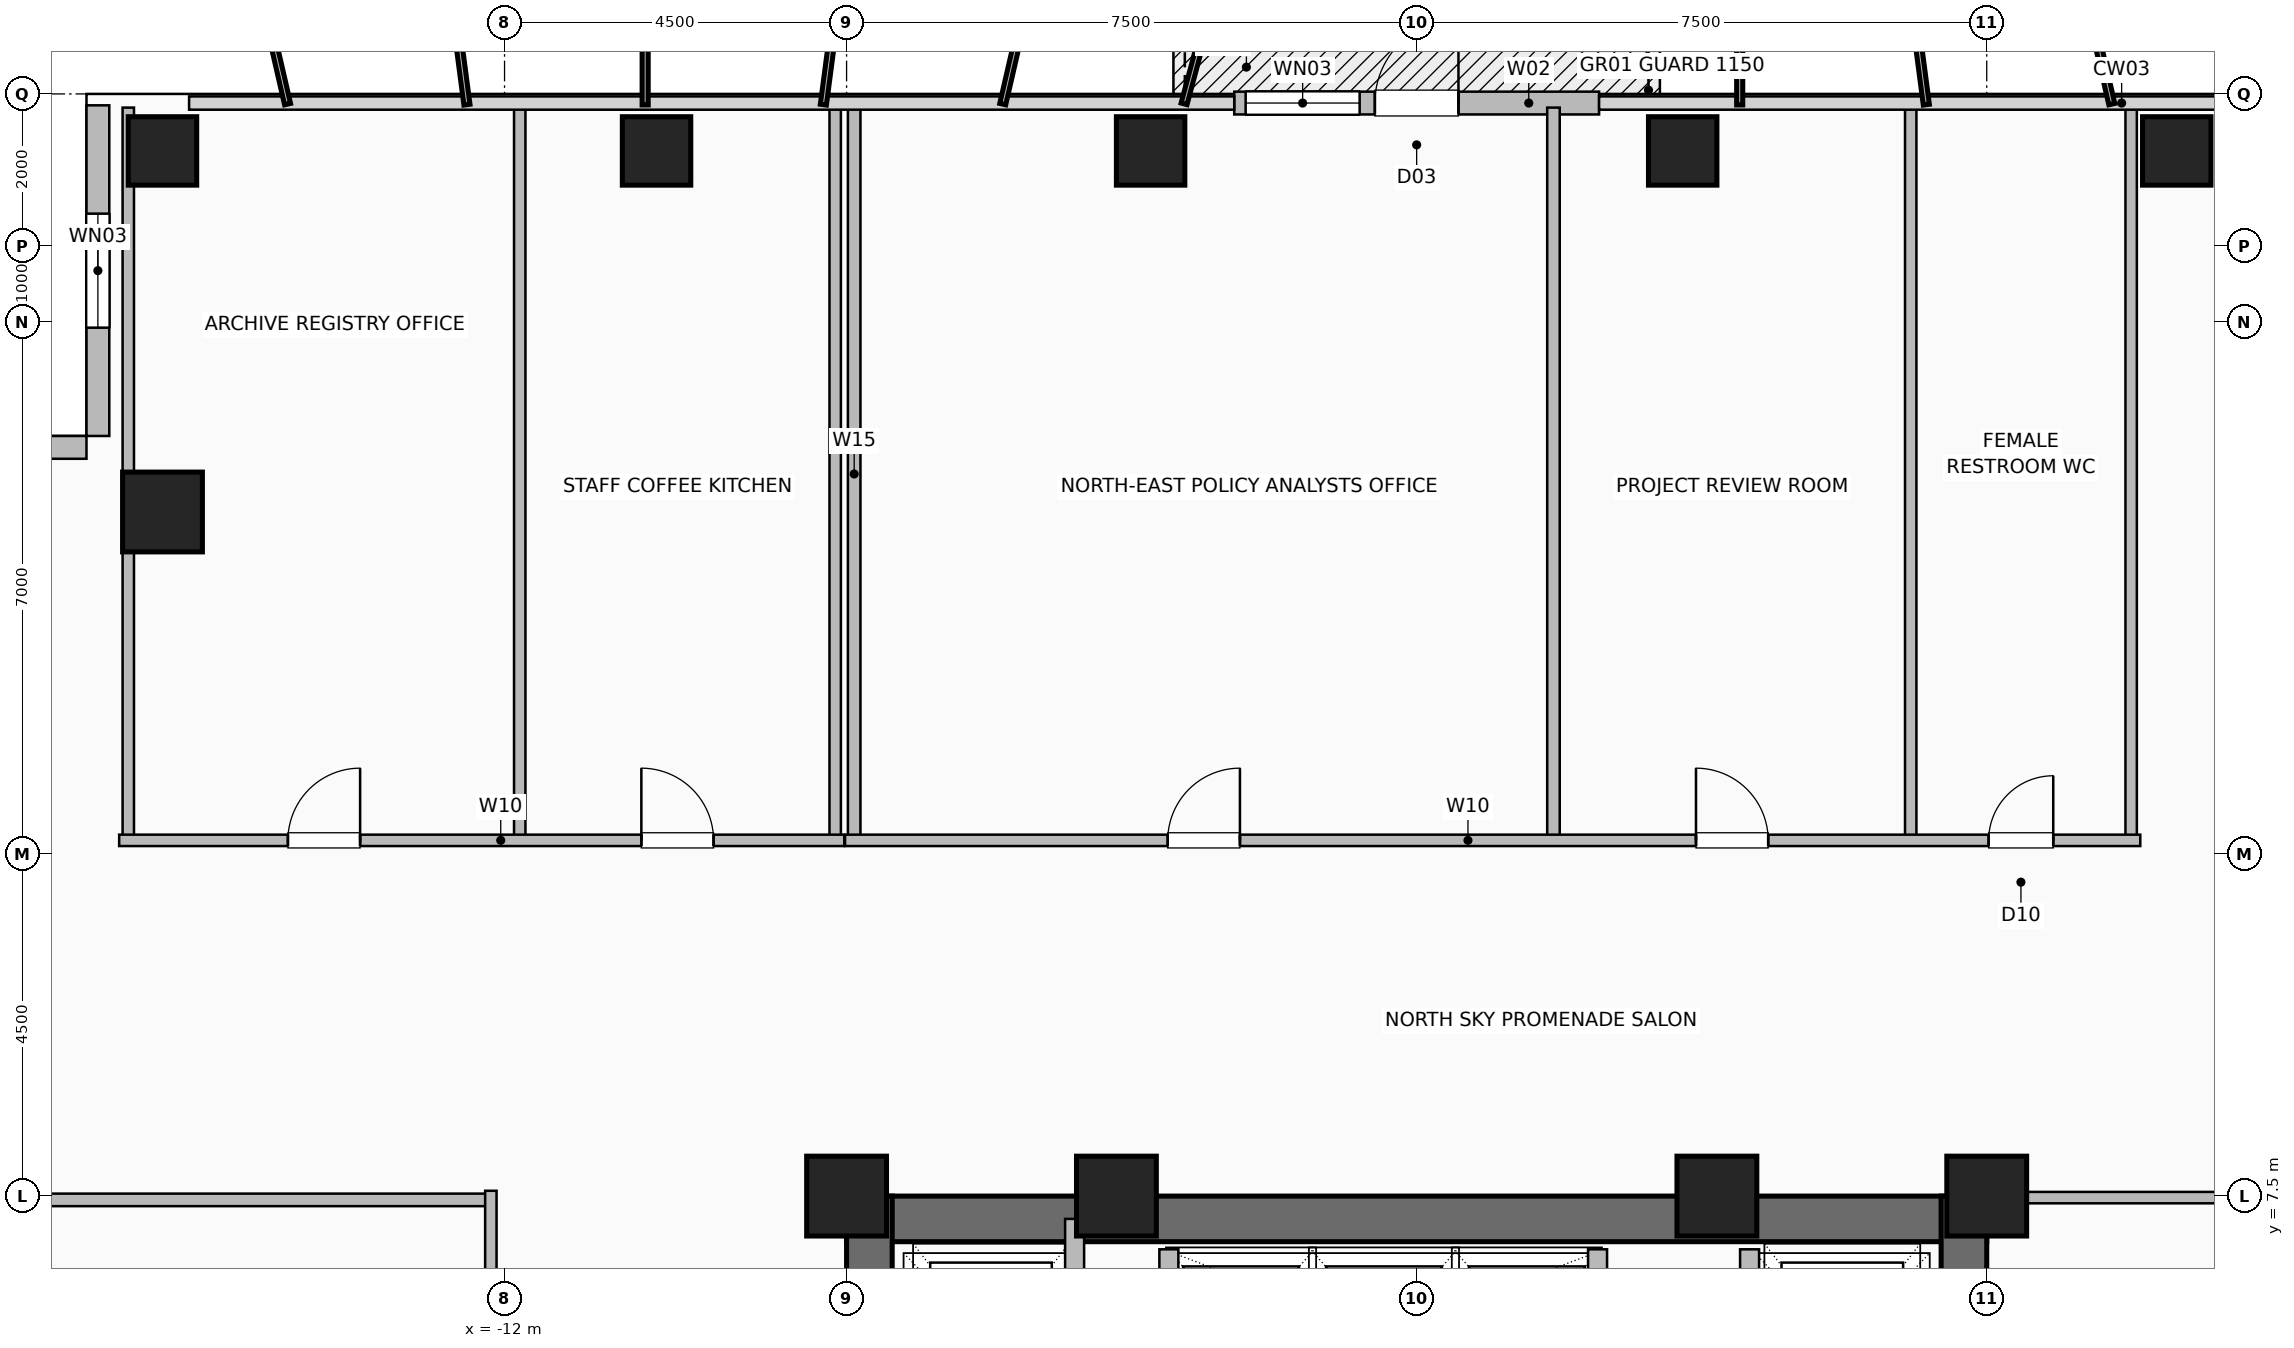
"""IFC4 building model, lengths in metres.
Left out: names, types, materials, properties, quantities, classifications, styles, units other than length and angle.
Written with IfcOpenShell. Run it as: python <this file> out.ifc"""

import sys

from ifc_helpers import new_model, si_unit, direction, frame, frame_2d, origin, origin_2d, place, context, subcontext, project, spatial, rectangle, hollow_rectangle, extrude, element, fill, save


model = new_model("IFC4")
c1 = context("Model", 3, precision=1e-05, world=origin(), true_north=direction((0.0, 1.0)))
c2 = subcontext(c1, "Body", "Model", "MODEL_VIEW")
j1 = project(units=[si_unit("LENGTHUNIT", "METRE"), si_unit("PLANEANGLEUNIT", "RADIAN")], contexts=[c1])
p1 = place(None, origin())
s1 = spatial("IfcSite", under=j1, at=p1, CompositionType="ELEMENT")
p2 = place(p1, origin())
s2 = spatial("IfcBuilding", under=s1, at=p2, CompositionType="ELEMENT")
p3 = place(p2, frame((0.0, 0.0, 115.6)))
s3 = spatial("IfcBuildingStorey", under=s2, at=p3, CompositionType="ELEMENT", Elevation=115.6)
for number, where, z_axis, x_axis in (
    (1, (7.5, 7.5, 0.0), (0.0, 0.0, 1.0), (1.0, 0.0, 0.0)),
    (2, (3.95, 7.5, 0.0), (0.0, 0.0, 1.0), (1.0, 0.0, 0.0)),
    (3, (-3.95, 7.5, 0.0), (0.0, 0.0, 1.0), (1.0, 0.0, 0.0)),
    (4, (-7.5, 7.5, 0.0), (0.0, 0.0, 1.0), (1.0, 0.0, 0.0)),
):
    element("IfcColumn", number, at=place(p3, frame(where, z_axis=z_axis, x_axis=x_axis)), inside=s3, PredefinedType="COLUMN", context=c2, shape_type="SweptSolid", body=[
        extrude(hollow_rectangle(XDim=1.05, YDim=1.05, WallThickness=0.05, at=origin_2d()), origin(), (0.0, 0.0, 1.0), 3.6),
    ])
for number, where, z_axis, x_axis in (
    (5, (-16.5, 21.25, 0.0), (0.0, 0.0, 1.0), (1.0, 0.0, 0.0)),
    (6, (-10.0, 21.25, 0.0), (0.0, 0.0, 1.0), (1.0, 0.0, 0.0)),
    (7, (-3.5, 21.25, 0.0), (0.0, 0.0, 1.0), (1.0, 0.0, 0.0)),
    (8, (3.5, 21.25, 0.0), (0.0, 0.0, 1.0), (1.0, 0.0, 0.0)),
    (9, (10.0, 21.25, 0.0), (0.0, 0.0, 1.0), (1.0, 0.0, 0.0)),
):
    element("IfcColumn", number, at=place(p3, frame(where, z_axis=z_axis, x_axis=x_axis)), inside=s3, PredefinedType="COLUMN", context=c2, shape_type="SweptSolid", body=[
        extrude(hollow_rectangle(XDim=0.9, YDim=0.9, WallThickness=0.045, at=origin_2d()), origin(), (0.0, 0.0, 1.0), 3.6),
    ])
p4 = place(p3, frame((-16.5, 16.5, 0.0), z_axis=(0.0, 0.0, 1.0), x_axis=(1.0, 0.0, 0.0)))
e10 = element("IfcColumn", 10, at=p4, inside=s3, PredefinedType="COLUMN", context=c2, shape_type="SweptSolid", body=[
    extrude(hollow_rectangle(XDim=1.05, YDim=1.05, WallThickness=0.05, at=origin_2d()), origin(), (0.0, 0.0, 1.0), 3.6),
])
p5 = place(p3, frame((-2.4, 21.88, 0.0), z_axis=(0.0, 0.0, 1.0), x_axis=(1.0, 0.0, 0.0)))
e11 = element("IfcWall", 11, at=p5, inside=s3, PredefinedType="SOLIDWALL", context=c2, shape_type="SweptSolid", body=[
    extrude(rectangle(XDim=4.8, YDim=0.3, at=frame_2d((2.4, 0.0))), origin(), (0.0, 0.0, 1.0), 3.36),
])
p6 = place(p5, frame((1.85, 0.0, 0.0)))
e12 = element("IfcOpeningElement", 12, at=p6, cuts=e11, PredefinedType="OPENING", context=c2, shape_type="SweptSolid", body=[
    extrude(rectangle(XDim=1.1, YDim=2.2, at=frame_2d((0.55, 1.1))), frame((0.0, 0.16, 0.0), z_axis=(0.0, -1.0, 0.0), x_axis=(1.0, 0.0, 0.0)), (0.0, 0.0, 1.0), 0.32),
])
p7 = place(p5, frame((0.15, 0.0, 0.85)))
e13 = element("IfcOpeningElement", 13, at=p7, cuts=e11, PredefinedType="OPENING", context=c2, shape_type="SweptSolid", body=[
    extrude(rectangle(XDim=1.5, YDim=1.8, at=frame_2d((0.75, 0.9))), frame((0.0, 0.16, 0.0), z_axis=(0.0, -1.0, 0.0), x_axis=(1.0, 0.0, 0.0)), (0.0, 0.0, 1.0), 0.32),
])
p8 = place(p3, frame((-17.35, 21.85, 0.0), z_axis=(0.0, 0.0, 1.0), x_axis=(0.0, -1.0, 0.0)))
e14 = element("IfcWall", 14, at=p8, inside=s3, PredefinedType="SOLIDWALL", context=c2, shape_type="SweptSolid", body=[
    extrude(rectangle(XDim=4.35, YDim=0.3, at=frame_2d((2.175, 0.0))), origin(), (0.0, 0.0, 1.0), 3.36),
])
p9 = place(p8, frame((1.425, 0.0, 0.9)))
e15 = element("IfcOpeningElement", 15, at=p9, cuts=e14, PredefinedType="OPENING", context=c2, shape_type="SweptSolid", body=[
    extrude(rectangle(XDim=1.5, YDim=1.8, at=frame_2d((0.75, 0.9))), frame((0.0, 0.16, 0.0), z_axis=(0.0, -1.0, 0.0), x_axis=(1.0, 0.0, 0.0)), (0.0, 0.0, 1.0), 0.32),
])
p10 = place(p3, frame((-21.85, 17.35, 0.0), z_axis=(0.0, 0.0, 1.0), x_axis=(1.0, 0.0, 0.0)))
e16 = element("IfcWall", 16, at=p10, inside=s3, PredefinedType="SOLIDWALL", context=c2, shape_type="SweptSolid", body=[
    extrude(rectangle(XDim=4.35, YDim=0.3, at=frame_2d((2.175, 0.0))), origin(), (0.0, 0.0, 1.0), 3.36),
])
p11 = place(p3, frame((-7.5, 7.2, 0.0), z_axis=(0.0, 0.0, 1.0), x_axis=(1.0, 0.0, 0.0)))
e17 = element("IfcWall", 17, at=p11, inside=s3, PredefinedType="SHEAR", context=c2, shape_type="SweptSolid", body=[
    extrude(rectangle(XDim=15.0, YDim=0.6, at=frame_2d((7.5, 0.0))), origin(), (0.0, 0.0, 1.0), 3.36),
])
p12 = place(p3, frame((-7.2, -7.5, 0.0), z_axis=(0.0, 0.0, 1.0), x_axis=(0.0, 1.0, 0.0)))
e18 = element("IfcWall", 18, at=p12, inside=s3, PredefinedType="SHEAR", context=c2, shape_type="SweptSolid", body=[
    extrude(rectangle(XDim=15.0, YDim=0.6, at=frame_2d((7.5, 0.0))), origin(), (0.0, 0.0, 1.0), 3.36),
])
p13 = place(p12, frame((9.5, 0.0, 0.0)))
e19 = element("IfcOpeningElement", 19, at=p13, cuts=e18, PredefinedType="OPENING", context=c2, shape_type="SweptSolid", body=[
    extrude(rectangle(XDim=1.0, YDim=2.08, at=frame_2d((0.5, 1.04))), frame((0.0, 0.31, 0.0), z_axis=(0.0, -1.0, 0.0), x_axis=(1.0, 0.0, 0.0)), (0.0, 0.0, 1.0), 0.62),
])
p14 = place(p3, frame((7.2, -7.5, 0.0), z_axis=(0.0, 0.0, 1.0), x_axis=(0.0, 1.0, 0.0)))
e20 = element("IfcWall", 20, at=p14, inside=s3, PredefinedType="SHEAR", context=c2, shape_type="SweptSolid", body=[
    extrude(rectangle(XDim=15.0, YDim=0.6, at=frame_2d((7.5, 0.0))), origin(), (0.0, 0.0, 1.0), 3.36),
])
for number, where, z_axis, x_axis in (
    (21, (-3.26, 4.58, 0.0), (0.0, 0.0, 1.0), (0.0, 1.0, 0.0)),
    (22, (2.38, 4.58, 0.0), (0.0, 0.0, 1.0), (0.0, 1.0, 0.0)),
):
    element("IfcWall", number, at=place(p3, frame(where, z_axis=z_axis, x_axis=x_axis)), inside=s3, PredefinedType="SHEAR", context=c2, shape_type="SweptSolid", body=[
        extrude(rectangle(XDim=2.22, YDim=0.25, at=frame_2d((1.11, 0.0))), origin(), (0.0, 0.0, 1.0), 3.36),
    ])
p15 = place(p3, frame((-4.5, 4.35, 0.0), z_axis=(0.0, 0.0, 1.0), x_axis=(0.0, 1.0, 0.0)))
e23 = element("IfcWall", 23, at=p15, inside=s3, PredefinedType="SHEAR", context=c2, shape_type="SweptSolid", body=[
    extrude(rectangle(XDim=2.85, YDim=0.25, at=frame_2d((1.425, 0.0))), origin(), (0.0, 0.0, 1.0), 3.36),
])
p16 = place(p3, frame((4.38, 4.3, 0.0), z_axis=(0.0, 0.0, 1.0), x_axis=(0.0, 1.0, 0.0)))
e24 = element("IfcWall", 24, at=p16, inside=s3, PredefinedType="SHEAR", context=c2, shape_type="SweptSolid", body=[
    extrude(rectangle(XDim=2.5, YDim=0.25, at=frame_2d((1.25, 0.0))), origin(), (0.0, 0.0, 1.0), 3.36),
])
p17 = place(p16, frame((0.8, 0.0, 0.0)))
e25 = element("IfcOpeningElement", 25, at=p17, cuts=e24, PredefinedType="OPENING", context=c2, shape_type="SweptSolid", body=[
    extrude(rectangle(XDim=1.2, YDim=2.2, at=frame_2d((0.6, 1.1))), frame((0.0, 0.135, 0.0), z_axis=(0.0, -1.0, 0.0), x_axis=(1.0, 0.0, 0.0)), (0.0, 0.0, 1.0), 0.27),
])
p18 = place(p3, frame((-21.82, 7.45, 0.0), z_axis=(0.0, 0.0, 1.0), x_axis=(1.0, 0.0, 0.0)))
e26 = element("IfcWall", 26, at=p18, inside=s3, PredefinedType="PLUMBINGWALL", context=c2, shape_type="SweptSolid", body=[
    extrude(rectangle(XDim=9.64, YDim=0.165, at=frame_2d((4.82, 0.0))), origin(), (0.0, 0.0, 1.0), 3.36),
])
p19 = place(p3, frame((-12.18, -7.57, 0.0), z_axis=(0.0, 0.0, 1.0), x_axis=(0.0, 1.0, 0.0)))
e27 = element("IfcWall", 27, at=p19, inside=s3, PredefinedType="PARTITIONING", context=c2, shape_type="SweptSolid", body=[
    extrude(rectangle(XDim=15.14, YDim=0.15, at=frame_2d((7.57, 0.0))), origin(), (0.0, 0.0, 1.0), 3.36),
])
p20 = place(p19, frame((7.095, 0.0, 0.0)))
e28 = element("IfcOpeningElement", 28, at=p20, cuts=e27, PredefinedType="OPENING", context=c2, shape_type="SweptSolid", body=[
    extrude(rectangle(XDim=0.95, YDim=2.06, at=frame_2d((0.475, 1.03))), frame((0.0, 0.085, 0.0), z_axis=(0.0, -1.0, 0.0), x_axis=(1.0, 0.0, 0.0)), (0.0, 0.0, 1.0), 0.17),
])
for number, where, z_axis, x_axis in (
    (29, (-16.95, 12.18, 0.0), (0.0, 0.0, 1.0), (0.0, 1.0, 0.0)),
    (30, (-11.8, 12.18, 0.0), (0.0, 0.0, 1.0), (0.0, 1.0, 0.0)),
    (31, (-7.65, 12.18, 0.0), (0.0, 0.0, 1.0), (0.0, 1.0, 0.0)),
):
    element("IfcWall", number, at=place(p3, frame(where, z_axis=z_axis, x_axis=x_axis)), inside=s3, PredefinedType="PARTITIONING", context=c2, shape_type="SweptSolid", body=[
        extrude(rectangle(XDim=9.64, YDim=0.15, at=frame_2d((4.82, 0.0))), origin(), (0.0, 0.0, 1.0), 3.36),
    ])
p21 = place(p3, frame((-17.07, 12.18, 0.0), z_axis=(0.0, 0.0, 1.0), x_axis=(1.0, 0.0, 0.0)))
e32 = element("IfcWall", 32, at=p21, inside=s3, PredefinedType="PARTITIONING", context=c2, shape_type="SweptSolid", body=[
    extrude(rectangle(XDim=9.54, YDim=0.15, at=frame_2d((4.77, 0.0))), origin(), (0.0, 0.0, 1.0), 3.36),
])
p22 = place(p21, frame((2.22, 0.0, 0.0)))
e33 = element("IfcOpeningElement", 33, at=p22, cuts=e32, PredefinedType="OPENING", context=c2, shape_type="SweptSolid", body=[
    extrude(rectangle(XDim=0.95, YDim=2.06, at=frame_2d((0.475, 1.03))), frame((0.0, 0.085, 0.0), z_axis=(0.0, -1.0, 0.0), x_axis=(1.0, 0.0, 0.0)), (0.0, 0.0, 1.0), 0.17),
])
p23 = place(p21, frame((6.87, 0.0, 0.0)))
e34 = element("IfcOpeningElement", 34, at=p23, cuts=e32, PredefinedType="OPENING", context=c2, shape_type="SweptSolid", body=[
    extrude(rectangle(XDim=0.95, YDim=2.06, at=frame_2d((0.475, 1.03))), frame((0.0, 0.085, 0.0), z_axis=(0.0, -1.0, 0.0), x_axis=(1.0, 0.0, 0.0)), (0.0, 0.0, 1.0), 0.17),
])
for number, where, z_axis, x_axis in (
    (35, (-7.4, 12.18, 0.0), (0.0, 0.0, 1.0), (0.0, 1.0, 0.0)),
    (36, (1.8, 12.18, 0.0), (0.0, 0.0, 1.0), (0.0, 1.0, 0.0)),
):
    element("IfcWall", number, at=place(p3, frame(where, z_axis=z_axis, x_axis=x_axis)), inside=s3, PredefinedType="PLUMBINGWALL", context=c2, shape_type="SweptSolid", body=[
        extrude(rectangle(XDim=9.64, YDim=0.165, at=frame_2d((4.82, 0.0))), origin(), (0.0, 0.0, 1.0), 3.36),
    ])
for number, where, z_axis, x_axis in (
    (37, (6.5, 12.18, 0.0), (0.0, 0.0, 1.0), (0.0, 1.0, 0.0)),
    (38, (9.4, 12.18, 0.0), (0.0, 0.0, 1.0), (0.0, 1.0, 0.0)),
):
    element("IfcWall", number, at=place(p3, frame(where, z_axis=z_axis, x_axis=x_axis)), inside=s3, PredefinedType="PARTITIONING", context=c2, shape_type="SweptSolid", body=[
        extrude(rectangle(XDim=9.64, YDim=0.15, at=frame_2d((4.82, 0.0))), origin(), (0.0, 0.0, 1.0), 3.36),
    ])
p24 = place(p3, frame((-7.52, 12.18, 0.0), z_axis=(0.0, 0.0, 1.0), x_axis=(1.0, 0.0, 0.0)))
e39 = element("IfcWall", 39, at=p24, inside=s3, PredefinedType="PARTITIONING", context=c2, shape_type="SweptSolid", body=[
    extrude(rectangle(XDim=17.04, YDim=0.15, at=frame_2d((8.52, 0.0))), origin(), (0.0, 0.0, 1.0), 3.36),
])
p25 = place(p24, frame((4.245, 0.0, 0.0)))
e40 = element("IfcOpeningElement", 40, at=p25, cuts=e39, PredefinedType="OPENING", context=c2, shape_type="SweptSolid", body=[
    extrude(rectangle(XDim=0.95, YDim=2.06, at=frame_2d((0.475, 1.03))), frame((0.0, 0.085, 0.0), z_axis=(0.0, -1.0, 0.0), x_axis=(1.0, 0.0, 0.0)), (0.0, 0.0, 1.0), 0.17),
])
p26 = place(p24, frame((11.195, 0.0, 0.0)))
e41 = element("IfcOpeningElement", 41, at=p26, cuts=e39, PredefinedType="OPENING", context=c2, shape_type="SweptSolid", body=[
    extrude(rectangle(XDim=0.95, YDim=2.06, at=frame_2d((0.475, 1.03))), frame((0.0, 0.085, 0.0), z_axis=(0.0, -1.0, 0.0), x_axis=(1.0, 0.0, 0.0)), (0.0, 0.0, 1.0), 0.17),
])
p27 = place(p24, frame((15.045, 0.0, 0.0)))
e42 = element("IfcOpeningElement", 42, at=p27, cuts=e39, PredefinedType="OPENING", context=c2, shape_type="SweptSolid", body=[
    extrude(rectangle(XDim=0.85, YDim=2.05, at=frame_2d((0.425, 1.025))), frame((0.0, 0.085, 0.0), z_axis=(0.0, -1.0, 0.0), x_axis=(1.0, 0.0, 0.0)), (0.0, 0.0, 1.0), 0.17),
])
p28 = place(p3, frame((7.6, 7.48, 0.0), z_axis=(0.0, 0.0, 1.0), x_axis=(1.0, 0.0, 0.0)))
e43 = element("IfcWall", 43, at=p28, inside=s3, PredefinedType="PARTITIONING", context=c2, shape_type="SweptSolid", body=[
    extrude(rectangle(XDim=14.22, YDim=0.15, at=frame_2d((7.11, 0.0))), origin(), (0.0, 0.0, 1.0), 3.36),
])
p29 = place(p6, origin())
e44 = element("IfcDoor", 44, at=p29, inside=s3, OperationType="SINGLE_SWING_RIGHT", PredefinedType="DOOR", context=c2, shape_type="SweptSolid", body=[
    extrude(rectangle(XDim=1.1, YDim=2.2, at=frame_2d((0.55, 1.1))), frame((0.0, 0.025, 0.0), z_axis=(0.0, -1.0, 0.0), x_axis=(1.0, 0.0, 0.0)), (0.0, 0.0, 1.0), 0.05),
])
fill(e12, e44)
p30 = place(p7, origin())
e45 = element("IfcWindow", 45, at=p30, inside=s3, PartitioningType="SINGLE_PANEL", PredefinedType="WINDOW", context=c2, shape_type="SweptSolid", body=[
    extrude(rectangle(XDim=1.5, YDim=1.8, at=frame_2d((0.75, 0.9))), frame((0.0, 0.03, 0.0), z_axis=(0.0, -1.0, 0.0), x_axis=(1.0, 0.0, 0.0)), (0.0, 0.0, 1.0), 0.06),
])
fill(e13, e45)
p31 = place(p9, origin())
e46 = element("IfcWindow", 46, at=p31, inside=s3, PartitioningType="SINGLE_PANEL", PredefinedType="WINDOW", context=c2, shape_type="SweptSolid", body=[
    extrude(rectangle(XDim=1.5, YDim=1.8, at=frame_2d((0.75, 0.9))), frame((0.0, 0.03, 0.0), z_axis=(0.0, -1.0, 0.0), x_axis=(1.0, 0.0, 0.0)), (0.0, 0.0, 1.0), 0.06),
])
fill(e15, e46)
p32 = place(p22, origin())
e47 = element("IfcDoor", 47, at=p32, inside=s3, OperationType="SINGLE_SWING_RIGHT", PredefinedType="DOOR", context=c2, shape_type="SweptSolid", body=[
    extrude(rectangle(XDim=0.95, YDim=2.06, at=frame_2d((0.475, 1.03))), frame((0.0, 0.025, 0.0), z_axis=(0.0, -1.0, 0.0), x_axis=(1.0, 0.0, 0.0)), (0.0, 0.0, 1.0), 0.05),
])
fill(e33, e47)
p33 = place(p23, origin())
e48 = element("IfcDoor", 48, at=p33, inside=s3, OperationType="SINGLE_SWING_LEFT", PredefinedType="DOOR", context=c2, shape_type="SweptSolid", body=[
    extrude(rectangle(XDim=0.95, YDim=2.06, at=frame_2d((0.475, 1.03))), frame((0.0, 0.025, 0.0), z_axis=(0.0, -1.0, 0.0), x_axis=(1.0, 0.0, 0.0)), (0.0, 0.0, 1.0), 0.05),
])
fill(e34, e48)
p34 = place(p25, origin())
e49 = element("IfcDoor", 49, at=p34, inside=s3, OperationType="SINGLE_SWING_RIGHT", PredefinedType="DOOR", context=c2, shape_type="SweptSolid", body=[
    extrude(rectangle(XDim=0.95, YDim=2.06, at=frame_2d((0.475, 1.03))), frame((0.0, 0.025, 0.0), z_axis=(0.0, -1.0, 0.0), x_axis=(1.0, 0.0, 0.0)), (0.0, 0.0, 1.0), 0.05),
])
fill(e40, e49)
p35 = place(p26, origin())
e50 = element("IfcDoor", 50, at=p35, inside=s3, OperationType="SINGLE_SWING_LEFT", PredefinedType="DOOR", context=c2, shape_type="SweptSolid", body=[
    extrude(rectangle(XDim=0.95, YDim=2.06, at=frame_2d((0.475, 1.03))), frame((0.0, 0.025, 0.0), z_axis=(0.0, -1.0, 0.0), x_axis=(1.0, 0.0, 0.0)), (0.0, 0.0, 1.0), 0.05),
])
fill(e41, e50)
p36 = place(p27, origin())
e51 = element("IfcDoor", 51, at=p36, inside=s3, OperationType="SINGLE_SWING_RIGHT", PredefinedType="DOOR", context=c2, shape_type="SweptSolid", body=[
    extrude(rectangle(XDim=0.85, YDim=2.05, at=frame_2d((0.425, 1.025))), frame((0.0, 0.025, 0.0), z_axis=(0.0, -1.0, 0.0), x_axis=(1.0, 0.0, 0.0)), (0.0, 0.0, 1.0), 0.05),
])
fill(e42, e51)
save(model, sys.argv[1])
